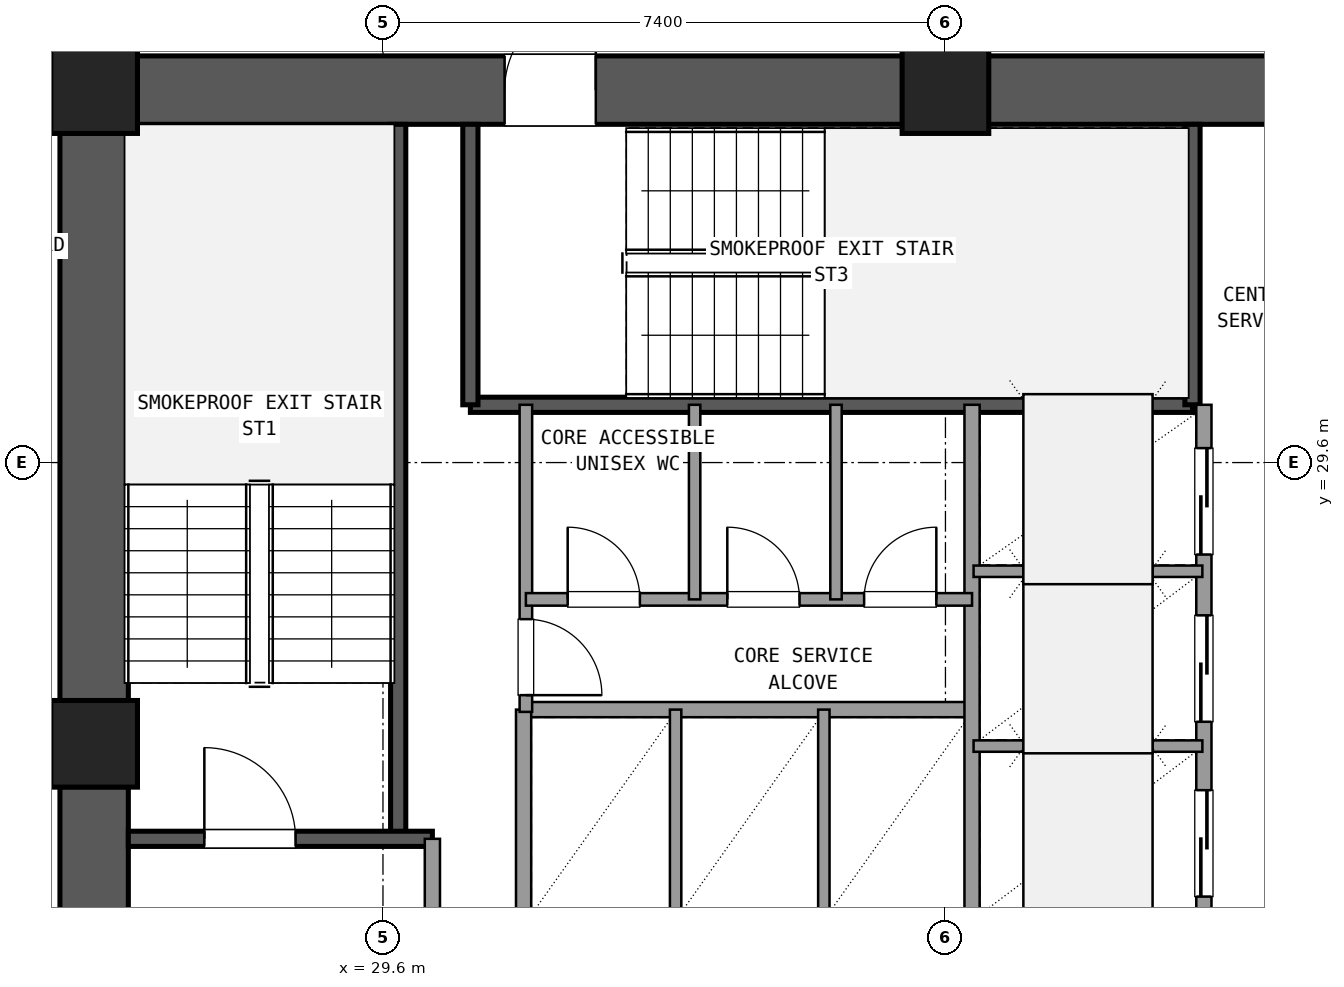
"""IFC4 building model, lengths in metres.
Left out: names, types, materials, properties, quantities, classifications, styles, units other than length and angle.
Written with IfcOpenShell. Run it as: python <this file> out.ifc"""

import sys

from ifc_helpers import new_model, si_unit, direction, frame, frame_2d, origin, origin_2d, place, context, subcontext, project, spatial, rectangle, extrude, element, fill, save


model = new_model("IFC4")
c1 = context("Model", 3, precision=1e-05, world=origin(), true_north=direction((0.0, 1.0)))
c2 = subcontext(c1, "Body", "Model", "MODEL_VIEW")
j1 = project(units=[si_unit("LENGTHUNIT", "METRE"), si_unit("PLANEANGLEUNIT", "RADIAN")], contexts=[c1])
p1 = place(None, origin())
s1 = spatial("IfcSite", under=j1, at=p1, CompositionType="ELEMENT")
p2 = place(p1, origin())
s2 = spatial("IfcBuilding", under=s1, at=p2, CompositionType="ELEMENT")
p3 = place(p2, frame((0.0, 0.0, 49.14)))
s3 = spatial("IfcBuildingStorey", under=s2, at=p3, CompositionType="ELEMENT", Elevation=49.14)
for number, where, z_axis, x_axis in (
    (1, (37.0, 34.5, 0.0), (0.0, 0.0, 1.0), (1.0, 0.0, 0.0)),
    (2, (25.8, 34.5, 0.0), (0.0, 0.0, 1.0), (1.0, 0.0, 0.0)),
    (3, (25.8, 25.9, 0.0), (0.0, 0.0, 1.0), (1.0, 0.0, 0.0)),
):
    element("IfcColumn", number, at=place(p3, frame(where, z_axis=z_axis, x_axis=x_axis)), inside=s3, PredefinedType="COLUMN", context=c2, shape_type="SweptSolid", body=[
        extrude(rectangle(XDim=1.14, YDim=1.14, at=origin_2d()), origin(), (0.0, 0.0, 1.0), 3.6),
    ])
p4 = place(p3, frame((47.635, 34.5, 0.0), z_axis=(0.0, 0.0, 1.0), x_axis=(-1.0, 0.0, 0.0)))
e4 = element("IfcWall", 4, at=p4, inside=s3, PredefinedType="SHEAR", context=c2, shape_type="SweptSolid", body=[
    extrude(rectangle(XDim=10.07, YDim=0.9, at=frame_2d((5.035, 0.0))), origin(), (0.0, 0.0, 1.0), 3.32),
])
p5 = place(p4, frame((4.535, 0.0, 0.0)))
e5 = element("IfcOpeningElement", 5, at=p5, cuts=e4, PredefinedType="OPENING", context=c2, shape_type="SweptSolid", body=[
    extrude(rectangle(XDim=1.6, YDim=2.2, at=frame_2d((0.8, 1.1))), frame((0.0, 0.46, 0.0), z_axis=(0.0, -1.0, 0.0), x_axis=(1.0, 0.0, 0.0)), (0.0, 0.0, 1.0), 0.92),
])
p6 = place(p3, frame((36.435, 34.5, 0.0), z_axis=(0.0, 0.0, 1.0), x_axis=(-1.0, 0.0, 0.0)))
e6 = element("IfcWall", 6, at=p6, inside=s3, PredefinedType="SHEAR", context=c2, shape_type="SweptSolid", body=[
    extrude(rectangle(XDim=10.07, YDim=0.9, at=frame_2d((5.035, 0.0))), origin(), (0.0, 0.0, 1.0), 3.32),
])
p7 = place(p6, frame((4.035, 0.0, 0.0)))
e7 = element("IfcOpeningElement", 7, at=p7, cuts=e6, PredefinedType="OPENING", context=c2, shape_type="SweptSolid", body=[
    extrude(rectangle(XDim=1.2, YDim=2.15, at=frame_2d((0.6, 1.075))), frame((0.0, 0.46, 0.0), z_axis=(0.0, -1.0, 0.0), x_axis=(1.0, 0.0, 0.0)), (0.0, 0.0, 1.0), 0.92),
])
p8 = place(p3, frame((25.8, 33.935, 0.0), z_axis=(0.0, 0.0, 1.0), x_axis=(0.0, -1.0, 0.0)))
e8 = element("IfcWall", 8, at=p8, inside=s3, PredefinedType="SHEAR", context=c2, shape_type="SweptSolid", body=[
    extrude(rectangle(XDim=7.47, YDim=0.9, at=frame_2d((3.735, 0.0))), origin(), (0.0, 0.0, 1.0), 3.32),
])
p9 = place(p3, frame((25.8, 25.335, 0.0), z_axis=(0.0, 0.0, 1.0), x_axis=(0.0, -1.0, 0.0)))
e9 = element("IfcWall", 9, at=p9, inside=s3, PredefinedType="SHEAR", context=c2, shape_type="SweptSolid", body=[
    extrude(rectangle(XDim=7.47, YDim=0.9, at=frame_2d((3.735, 0.0))), origin(), (0.0, 0.0, 1.0), 3.32),
])
p10 = place(p9, frame((2.085, 0.0, 0.0)))
e10 = element("IfcOpeningElement", 10, at=p10, cuts=e9, PredefinedType="OPENING", context=c2, shape_type="SweptSolid", body=[
    extrude(rectangle(XDim=1.2, YDim=2.15, at=frame_2d((0.6, 1.075))), frame((0.0, 0.46, 0.0), z_axis=(0.0, -1.0, 0.0), x_axis=(1.0, 0.0, 0.0)), (0.0, 0.0, 1.0), 0.92),
])
p11 = place(p3, frame((29.8, 24.65, 0.0), z_axis=(0.0, 0.0, 1.0), x_axis=(0.0, 1.0, 0.0)))
e11 = element("IfcWall", 11, at=p11, inside=s3, PredefinedType="SHEAR", context=c2, shape_type="SweptSolid", body=[
    extrude(rectangle(XDim=9.4, YDim=0.2, at=frame_2d((4.7, 0.0))), origin(), (0.0, 0.0, 1.0), 3.32),
])
p12 = place(p3, frame((26.25, 24.65, 0.0), z_axis=(0.0, 0.0, 1.0), x_axis=(1.0, 0.0, 0.0)))
e12 = element("IfcWall", 12, at=p12, inside=s3, PredefinedType="SHEAR", context=c2, shape_type="SweptSolid", body=[
    extrude(rectangle(XDim=4.0, YDim=0.2, at=frame_2d((2.0, 0.0))), origin(), (0.0, 0.0, 1.0), 3.32),
])
p13 = place(p12, frame((1.0, 0.0, 0.0)))
e13 = element("IfcOpeningElement", 13, at=p13, cuts=e12, PredefinedType="OPENING", context=c2, shape_type="SweptSolid", body=[
    extrude(rectangle(XDim=1.2, YDim=2.15, at=frame_2d((0.6, 1.075))), frame((0.0, 0.11, 0.0), z_axis=(0.0, -1.0, 0.0), x_axis=(1.0, 0.0, 0.0)), (0.0, 0.0, 1.0), 0.22),
])
p14 = place(p3, frame((30.75, 30.36, 0.0), z_axis=(0.0, 0.0, 1.0), x_axis=(1.0, 0.0, 0.0)))
e14 = element("IfcWall", 14, at=p14, inside=s3, PredefinedType="SHEAR", context=c2, shape_type="SweptSolid", body=[
    extrude(rectangle(XDim=9.5, YDim=0.2, at=frame_2d((4.75, 0.0))), origin(), (0.0, 0.0, 1.0), 3.32),
])
for number, where, z_axis, x_axis in (
    (15, (30.75, 30.36, 0.0), (0.0, 0.0, 1.0), (0.0, 1.0, 0.0)),
    (16, (40.25, 30.36, 0.0), (0.0, 0.0, 1.0), (0.0, 1.0, 0.0)),
):
    element("IfcWall", number, at=place(p3, frame(where, z_axis=z_axis, x_axis=x_axis)), inside=s3, PredefinedType="SHEAR", context=c2, shape_type="SweptSolid", body=[
        extrude(rectangle(XDim=3.69, YDim=0.2, at=frame_2d((1.845, 0.0))), origin(), (0.0, 0.0, 1.0), 3.32),
    ])
p15 = place(p3, frame((30.25, 17.75, 0.0), z_axis=(0.0, 0.0, 1.0), x_axis=(0.0, 1.0, 0.0)))
e17 = element("IfcWall", 17, at=p15, inside=s3, PredefinedType="SOLIDWALL", context=c2, shape_type="SweptSolid", body=[
    extrude(rectangle(XDim=6.9, YDim=0.2, at=frame_2d((3.45, 0.0))), origin(), (0.0, 0.0, 1.0), 2.61),
])
p16 = place(p15, frame((4.15, 0.0, 0.0)))
e18 = element("IfcOpeningElement", 18, at=p16, cuts=e17, PredefinedType="OPENING", context=c2, shape_type="SweptSolid", body=[
    extrude(rectangle(XDim=1.2, YDim=2.15, at=frame_2d((0.6, 1.075))), frame((0.0, 0.11, 0.0), z_axis=(0.0, -1.0, 0.0), x_axis=(1.0, 0.0, 0.0)), (0.0, 0.0, 1.0), 0.22),
])
p17 = place(p3, frame((31.45, 26.35, 0.0), z_axis=(0.0, 0.0, 1.0), x_axis=(1.0, 0.0, 0.0)))
e19 = element("IfcWall", 19, at=p17, inside=s3, PredefinedType="SOLIDWALL", context=c2, shape_type="SweptSolid", body=[
    extrude(rectangle(XDim=5.9, YDim=0.2, at=frame_2d((2.95, 0.0))), origin(), (0.0, 0.0, 1.0), 2.61),
])
p18 = place(p3, frame((31.45, 23.54, 0.0), z_axis=(0.0, 0.0, 1.0), x_axis=(0.0, 1.0, 0.0)))
e20 = element("IfcWall", 20, at=p18, inside=s3, PredefinedType="SOLIDWALL", context=c2, shape_type="SweptSolid", body=[
    extrude(rectangle(XDim=2.81, YDim=0.2, at=frame_2d((1.405, 0.0))), origin(), (0.0, 0.0, 1.0), 2.61),
])
for number, where, z_axis, x_axis in (
    (21, (33.45, 23.54, 0.0), (0.0, 0.0, 1.0), (0.0, 1.0, 0.0)),
    (22, (35.4, 23.54, 0.0), (0.0, 0.0, 1.0), (0.0, 1.0, 0.0)),
):
    element("IfcWall", number, at=place(p3, frame(where, z_axis=z_axis, x_axis=x_axis)), inside=s3, PredefinedType="PARTITIONING", context=c2, shape_type="SweptSolid", body=[
        extrude(rectangle(XDim=2.81, YDim=0.15, at=frame_2d((1.405, 0.0))), origin(), (0.0, 0.0, 1.0), 2.61),
    ])
p19 = place(p3, frame((37.35, 23.54, 0.0), z_axis=(0.0, 0.0, 1.0), x_axis=(0.0, 1.0, 0.0)))
e23 = element("IfcWall", 23, at=p19, inside=s3, PredefinedType="SOLIDWALL", context=c2, shape_type="SweptSolid", body=[
    extrude(rectangle(XDim=6.82, YDim=0.2, at=frame_2d((3.41, 0.0))), origin(), (0.0, 0.0, 1.0), 2.61),
])
p20 = place(p3, frame((40.4, 23.54, 0.0), z_axis=(0.0, 0.0, 1.0), x_axis=(0.0, 1.0, 0.0)))
e24 = element("IfcWall", 24, at=p20, inside=s3, PredefinedType="SOLIDWALL", context=c2, shape_type="SweptSolid", body=[
    extrude(rectangle(XDim=6.82, YDim=0.2, at=frame_2d((3.41, 0.0))), origin(), (0.0, 0.0, 1.0), 2.61),
])
p21 = place(p20, frame((0.35, 0.0, 0.0)))
e25 = element("IfcOpeningElement", 25, at=p21, cuts=e24, PredefinedType="OPENING", context=c2, shape_type="SweptSolid", body=[
    extrude(rectangle(XDim=1.4, YDim=2.2, at=frame_2d((0.7, 1.1))), frame((0.0, 0.11, 0.0), z_axis=(0.0, -1.0, 0.0), x_axis=(1.0, 0.0, 0.0)), (0.0, 0.0, 1.0), 0.22),
])
p22 = place(p20, frame((2.65, 0.0, 0.0)))
e26 = element("IfcOpeningElement", 26, at=p22, cuts=e24, PredefinedType="OPENING", context=c2, shape_type="SweptSolid", body=[
    extrude(rectangle(XDim=1.4, YDim=2.2, at=frame_2d((0.7, 1.1))), frame((0.0, 0.11, 0.0), z_axis=(0.0, -1.0, 0.0), x_axis=(1.0, 0.0, 0.0)), (0.0, 0.0, 1.0), 0.22),
])
p23 = place(p20, frame((4.85, 0.0, 0.0)))
e27 = element("IfcOpeningElement", 27, at=p23, cuts=e24, PredefinedType="OPENING", context=c2, shape_type="SweptSolid", body=[
    extrude(rectangle(XDim=1.4, YDim=2.2, at=frame_2d((0.7, 1.1))), frame((0.0, 0.11, 0.0), z_axis=(0.0, -1.0, 0.0), x_axis=(1.0, 0.0, 0.0)), (0.0, 0.0, 1.0), 0.22),
])
for number, where, z_axis, x_axis in (
    (28, (37.37, 25.87, 0.0), (0.0, 0.0, 1.0), (1.0, 0.0, 0.0)),
    (29, (37.37, 28.17, 0.0), (0.0, 0.0, 1.0), (1.0, 0.0, 0.0)),
):
    element("IfcWall", number, at=place(p3, frame(where, z_axis=z_axis, x_axis=x_axis)), inside=s3, PredefinedType="PARTITIONING", context=c2, shape_type="SweptSolid", body=[
        extrude(rectangle(XDim=3.01, YDim=0.15, at=frame_2d((1.505, 0.0))), origin(), (0.0, 0.0, 1.0), 2.61),
    ])
p24 = place(p3, frame((31.48, 26.32, 0.0), z_axis=(0.0, 0.0, 1.0), x_axis=(0.0, 1.0, 0.0)))
e30 = element("IfcWall", 30, at=p24, inside=s3, PredefinedType="PLUMBINGWALL", context=c2, shape_type="SweptSolid", body=[
    extrude(rectangle(XDim=4.04, YDim=0.165, at=frame_2d((2.02, 0.0))), origin(), (0.0, 0.0, 1.0), 2.61),
])
p25 = place(p24, frame((0.22, 0.0, 0.0)))
e31 = element("IfcOpeningElement", 31, at=p25, cuts=e30, PredefinedType="OPENING", context=c2, shape_type="SweptSolid", body=[
    extrude(rectangle(XDim=1.0, YDim=2.15, at=frame_2d((0.5, 1.075))), frame((0.0, 0.093, 0.0), z_axis=(0.0, -1.0, 0.0), x_axis=(1.0, 0.0, 0.0)), (0.0, 0.0, 1.0), 0.185),
])
p26 = place(p3, frame((31.48, 27.8, 0.0), z_axis=(0.0, 0.0, 1.0), x_axis=(1.0, 0.0, 0.0)))
e32 = element("IfcWall", 32, at=p26, inside=s3, PredefinedType="PLUMBINGWALL", context=c2, shape_type="SweptSolid", body=[
    extrude(rectangle(XDim=5.87, YDim=0.165, at=frame_2d((2.935, 0.0))), origin(), (0.0, 0.0, 1.0), 2.61),
])
p27 = place(p26, frame((0.55, 0.0, 0.0)))
e33 = element("IfcOpeningElement", 33, at=p27, cuts=e32, PredefinedType="OPENING", context=c2, shape_type="SweptSolid", body=[
    extrude(rectangle(XDim=0.95, YDim=2.1, at=frame_2d((0.475, 1.05))), frame((0.0, 0.093, 0.0), z_axis=(0.0, -1.0, 0.0), x_axis=(1.0, 0.0, 0.0)), (0.0, 0.0, 1.0), 0.185),
])
p28 = place(p26, frame((2.65, 0.0, 0.0)))
e34 = element("IfcOpeningElement", 34, at=p28, cuts=e32, PredefinedType="OPENING", context=c2, shape_type="SweptSolid", body=[
    extrude(rectangle(XDim=0.95, YDim=2.1, at=frame_2d((0.475, 1.05))), frame((0.0, 0.093, 0.0), z_axis=(0.0, -1.0, 0.0), x_axis=(1.0, 0.0, 0.0)), (0.0, 0.0, 1.0), 0.185),
])
p29 = place(p26, frame((4.45, 0.0, 0.0)))
e35 = element("IfcOpeningElement", 35, at=p29, cuts=e32, PredefinedType="OPENING", context=c2, shape_type="SweptSolid", body=[
    extrude(rectangle(XDim=0.95, YDim=2.1, at=frame_2d((0.475, 1.05))), frame((0.0, 0.093, 0.0), z_axis=(0.0, -1.0, 0.0), x_axis=(1.0, 0.0, 0.0)), (0.0, 0.0, 1.0), 0.185),
])
for number, where, z_axis, x_axis in (
    (36, (33.7, 27.8, 0.0), (0.0, 0.0, 1.0), (0.0, 1.0, 0.0)),
    (37, (35.56, 27.8, 0.0), (0.0, 0.0, 1.0), (0.0, 1.0, 0.0)),
):
    element("IfcWall", number, at=place(p3, frame(where, z_axis=z_axis, x_axis=x_axis)), inside=s3, PredefinedType="PARTITIONING", context=c2, shape_type="SweptSolid", body=[
        extrude(rectangle(XDim=2.56, YDim=0.15, at=frame_2d((1.28, 0.0))), origin(), (0.0, 0.0, 1.0), 2.61),
    ])
p30 = place(p3, frame((37.0, 34.95, 0.0), z_axis=(0.0, 0.0, 1.0), x_axis=(0.0, 1.0, 0.0)))
e38 = element("IfcWall", 38, at=p30, inside=s3, PredefinedType="PARTITIONING", context=c2, shape_type="SweptSolid", body=[
    extrude(rectangle(XDim=2.7, YDim=0.18, at=frame_2d((1.35, 0.0))), origin(), (0.0, 0.0, 1.0), 2.61),
])
p31 = place(p30, frame((0.35, 0.0, 0.0)))
e39 = element("IfcOpeningElement", 39, at=p31, cuts=e38, PredefinedType="OPENING", context=c2, shape_type="SweptSolid", body=[
    extrude(rectangle(XDim=2.0, YDim=2.2, at=frame_2d((1.0, 1.1))), frame((0.0, 0.1, 0.0), z_axis=(0.0, -1.0, 0.0), x_axis=(1.0, 0.0, 0.0)), (0.0, 0.0, 1.0), 0.2),
])
p32 = place(p13, origin())
e40 = element("IfcDoor", 40, at=p32, inside=s3, OperationType="SINGLE_SWING_LEFT", PredefinedType="DOOR", context=c2, shape_type="SweptSolid", body=[
    extrude(rectangle(XDim=1.2, YDim=2.15, at=frame_2d((0.6, 1.075))), frame((0.0, 0.025, 0.0), z_axis=(0.0, -1.0, 0.0), x_axis=(1.0, 0.0, 0.0)), (0.0, 0.0, 1.0), 0.05),
])
fill(e13, e40)
p33 = place(p7, frame((1.2, 0.0, 0.0), z_axis=(0.0, 0.0, 1.0), x_axis=(-1.0, 0.0, 0.0)))
e41 = element("IfcDoor", 41, at=p33, inside=s3, OperationType="SINGLE_SWING_LEFT", PredefinedType="DOOR", context=c2, shape_type="SweptSolid", body=[
    extrude(rectangle(XDim=1.2, YDim=2.15, at=frame_2d((0.6, 1.075))), frame((0.0, 0.025, 0.0), z_axis=(0.0, -1.0, 0.0), x_axis=(1.0, 0.0, 0.0)), (0.0, 0.0, 1.0), 0.05),
])
fill(e7, e41)
p34 = place(p21, origin())
e42 = element("IfcDoor", 42, at=p34, inside=s3, OperationType="SLIDING_TO_LEFT", PredefinedType="DOOR", context=c2, shape_type="SweptSolid", body=[
    extrude(rectangle(XDim=1.4, YDim=2.2, at=frame_2d((0.7, 1.1))), frame((0.0, 0.025, 0.0), z_axis=(0.0, -1.0, 0.0), x_axis=(1.0, 0.0, 0.0)), (0.0, 0.0, 1.0), 0.05),
])
fill(e25, e42)
p35 = place(p22, origin())
e43 = element("IfcDoor", 43, at=p35, inside=s3, OperationType="SLIDING_TO_LEFT", PredefinedType="DOOR", context=c2, shape_type="SweptSolid", body=[
    extrude(rectangle(XDim=1.4, YDim=2.2, at=frame_2d((0.7, 1.1))), frame((0.0, 0.025, 0.0), z_axis=(0.0, -1.0, 0.0), x_axis=(1.0, 0.0, 0.0)), (0.0, 0.0, 1.0), 0.05),
])
fill(e26, e43)
p36 = place(p23, origin())
e44 = element("IfcDoor", 44, at=p36, inside=s3, OperationType="SLIDING_TO_RIGHT", PredefinedType="DOOR", context=c2, shape_type="SweptSolid", body=[
    extrude(rectangle(XDim=1.4, YDim=2.2, at=frame_2d((0.7, 1.1))), frame((0.0, 0.025, 0.0), z_axis=(0.0, -1.0, 0.0), x_axis=(1.0, 0.0, 0.0)), (0.0, 0.0, 1.0), 0.05),
])
fill(e27, e44)
p37 = place(p25, frame((1.0, 0.0, 0.0), z_axis=(0.0, 0.0, 1.0), x_axis=(-1.0, 0.0, 0.0)))
e45 = element("IfcDoor", 45, at=p37, inside=s3, OperationType="SINGLE_SWING_LEFT", PredefinedType="DOOR", context=c2, shape_type="SweptSolid", body=[
    extrude(rectangle(XDim=1.0, YDim=2.15, at=frame_2d((0.5, 1.075))), frame((0.0, 0.025, 0.0), z_axis=(0.0, -1.0, 0.0), x_axis=(1.0, 0.0, 0.0)), (0.0, 0.0, 1.0), 0.05),
])
fill(e31, e45)
p38 = place(p27, origin())
e46 = element("IfcDoor", 46, at=p38, inside=s3, OperationType="SINGLE_SWING_LEFT", PredefinedType="DOOR", context=c2, shape_type="SweptSolid", body=[
    extrude(rectangle(XDim=0.95, YDim=2.1, at=frame_2d((0.475, 1.05))), frame((0.0, 0.025, 0.0), z_axis=(0.0, -1.0, 0.0), x_axis=(1.0, 0.0, 0.0)), (0.0, 0.0, 1.0), 0.05),
])
fill(e33, e46)
p39 = place(p28, origin())
e47 = element("IfcDoor", 47, at=p39, inside=s3, OperationType="SINGLE_SWING_LEFT", PredefinedType="DOOR", context=c2, shape_type="SweptSolid", body=[
    extrude(rectangle(XDim=0.95, YDim=2.1, at=frame_2d((0.475, 1.05))), frame((0.0, 0.025, 0.0), z_axis=(0.0, -1.0, 0.0), x_axis=(1.0, 0.0, 0.0)), (0.0, 0.0, 1.0), 0.05),
])
fill(e34, e47)
p40 = place(p29, origin())
e48 = element("IfcDoor", 48, at=p40, inside=s3, OperationType="SINGLE_SWING_RIGHT", PredefinedType="DOOR", context=c2, shape_type="SweptSolid", body=[
    extrude(rectangle(XDim=0.95, YDim=2.1, at=frame_2d((0.475, 1.05))), frame((0.0, 0.025, 0.0), z_axis=(0.0, -1.0, 0.0), x_axis=(1.0, 0.0, 0.0)), (0.0, 0.0, 1.0), 0.05),
])
fill(e35, e48)
save(model, sys.argv[1])
